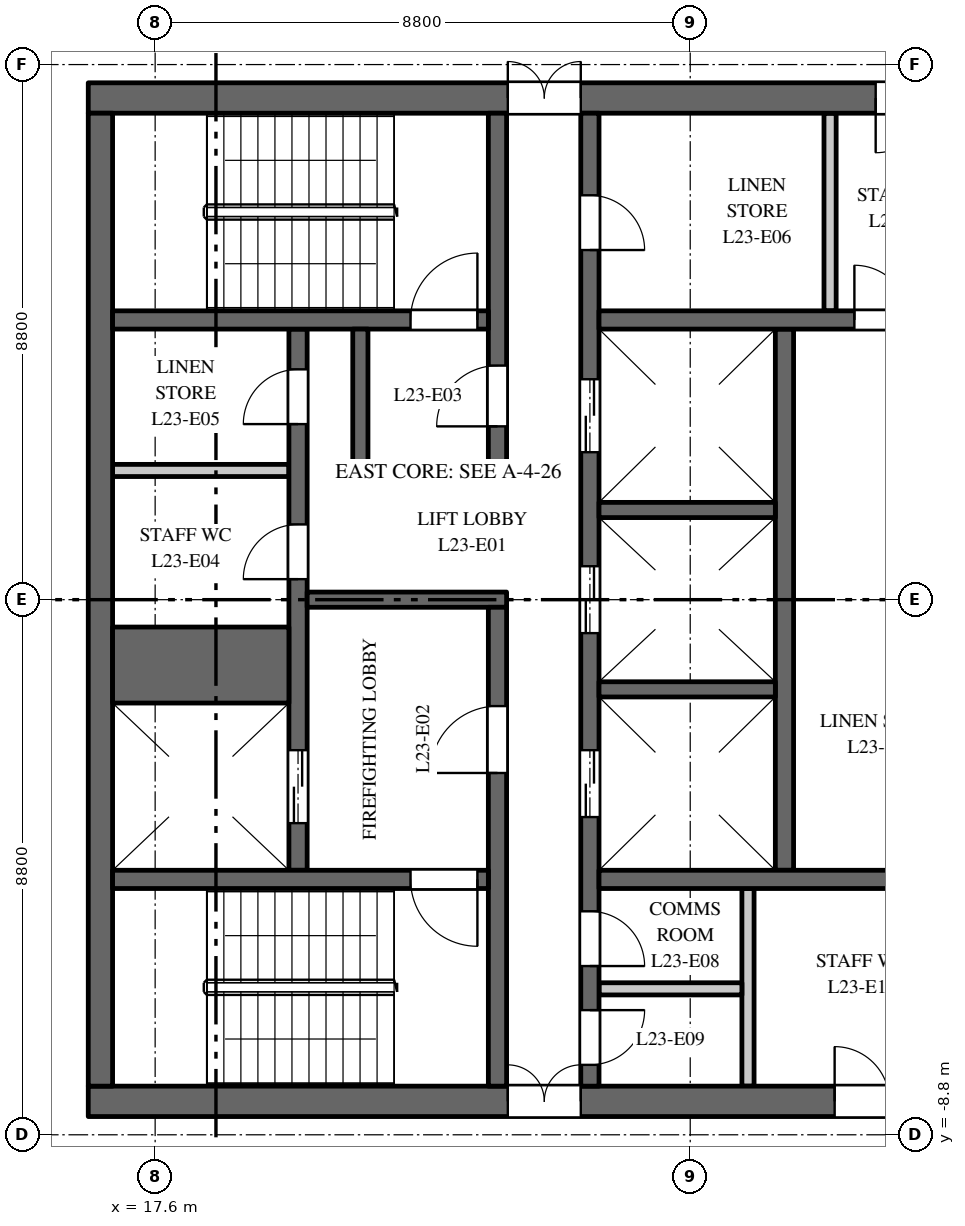
"""IFC4 building model, lengths in metres.
Left out: names, types, materials, properties, quantities, classifications, styles, units other than length and angle.
Written with IfcOpenShell. Run it as: python <this file> out.ifc"""

import sys

from ifc_helpers import new_model, si_unit, direction, frame, frame_2d, origin, place, context, subcontext, project, spatial, rectangle, extrude, element, fill, save


model = new_model("IFC4")
c1 = context("Model", 3, precision=1e-05, world=origin(), true_north=direction((0.0, 1.0)))
c2 = subcontext(c1, "Body", "Model", "MODEL_VIEW")
j1 = project(units=[si_unit("LENGTHUNIT", "METRE"), si_unit("PLANEANGLEUNIT", "RADIAN")], contexts=[c1])
p1 = place(None, origin())
s1 = spatial("IfcSite", under=j1, at=p1, CompositionType="ELEMENT")
p2 = place(p1, origin())
s2 = spatial("IfcBuilding", under=s1, at=p2, CompositionType="ELEMENT")
p3 = place(p2, frame((0.0, 0.0, 104.0)))
s3 = spatial("IfcBuildingStorey", under=s2, at=p3, CompositionType="ELEMENT", Elevation=104.0)
p4 = place(p3, frame((16.5, 8.25, 0.0), z_axis=(0.0, 0.0, 1.0), x_axis=(1.0, 0.0, 0.0)))
e1 = element("IfcWall", 1, at=p4, inside=s3, PredefinedType="SHEAR", context=c2, shape_type="SweptSolid", body=[
    extrude(rectangle(XDim=15.0, YDim=0.5, at=frame_2d((7.5, 0.0))), origin(), (0.0, 0.0, 1.0), 3.7),
])
p5 = place(p4, frame((6.9, 0.0, 0.0)))
e2 = element("IfcOpeningElement", 2, at=p5, cuts=e1, PredefinedType="OPENING", context=c2, shape_type="SweptSolid", body=[
    extrude(rectangle(XDim=1.2, YDim=2.1, at=frame_2d((0.6, 1.05))), frame((0.0, 0.26, 0.0), z_axis=(0.0, -1.0, 0.0), x_axis=(1.0, 0.0, 0.0)), (0.0, 0.0, 1.0), 0.52),
])
p6 = place(p4, frame((12.95, 0.0, 0.0)))
e3 = element("IfcOpeningElement", 3, at=p6, cuts=e1, PredefinedType="OPENING", context=c2, shape_type="SweptSolid", body=[
    extrude(rectangle(XDim=0.9, YDim=2.1, at=frame_2d((0.45, 1.05))), frame((0.0, 0.26, 0.0), z_axis=(0.0, -1.0, 0.0), x_axis=(1.0, 0.0, 0.0)), (0.0, 0.0, 1.0), 0.52),
])
p7 = place(p3, frame((16.5, -8.25, 0.0), z_axis=(0.0, 0.0, 1.0), x_axis=(1.0, 0.0, 0.0)))
e4 = element("IfcWall", 4, at=p7, inside=s3, PredefinedType="SHEAR", context=c2, shape_type="SweptSolid", body=[
    extrude(rectangle(XDim=15.0, YDim=0.5, at=frame_2d((7.5, 0.0))), origin(), (0.0, 0.0, 1.0), 3.7),
])
p8 = place(p7, frame((6.9, 0.0, 0.0)))
e5 = element("IfcOpeningElement", 5, at=p8, cuts=e4, PredefinedType="OPENING", context=c2, shape_type="SweptSolid", body=[
    extrude(rectangle(XDim=1.2, YDim=2.1, at=frame_2d((0.6, 1.05))), frame((0.0, 0.26, 0.0), z_axis=(0.0, -1.0, 0.0), x_axis=(1.0, 0.0, 0.0)), (0.0, 0.0, 1.0), 0.52),
])
p9 = place(p7, frame((12.275, 0.0, 0.0)))
e6 = element("IfcOpeningElement", 6, at=p9, cuts=e4, PredefinedType="OPENING", context=c2, shape_type="SweptSolid", body=[
    extrude(rectangle(XDim=0.9, YDim=2.1, at=frame_2d((0.45, 1.05))), frame((0.0, 0.26, 0.0), z_axis=(0.0, -1.0, 0.0), x_axis=(1.0, 0.0, 0.0)), (0.0, 0.0, 1.0), 0.52),
])
p10 = place(p3, frame((16.9, 2.125, 0.0), z_axis=(0.0, 0.0, 1.0), x_axis=(1.0, 0.0, 0.0)))
e7 = element("IfcWall", 7, at=p10, inside=s3, PredefinedType="PARTITIONING", context=c2, shape_type="SweptSolid", body=[
    extrude(rectangle(XDim=2.9, YDim=0.2, at=frame_2d((1.45, 0.0))), origin(), (0.0, 0.0, 1.0), 3.7),
])
p11 = place(p3, frame((27.95, -4.45, 0.0), z_axis=(0.0, 0.0, 1.0), x_axis=(0.0, 1.0, 0.0)))
e8 = element("IfcWall", 8, at=p11, inside=s3, PredefinedType="SHEAR", context=c2, shape_type="SweptSolid", body=[
    extrude(rectangle(XDim=8.9, YDim=0.3, at=frame_2d((4.45, 0.0))), origin(), (0.0, 0.0, 1.0), 3.7),
])
p12 = place(p3, frame((19.95, -4.45, 0.0), z_axis=(0.0, 0.0, 1.0), x_axis=(0.0, 1.0, 0.0)))
e9 = element("IfcWall", 9, at=p12, inside=s3, PredefinedType="SHEAR", context=c2, shape_type="SweptSolid", body=[
    extrude(rectangle(XDim=8.9, YDim=0.3, at=frame_2d((4.45, 0.0))), origin(), (0.0, 0.0, 1.0), 3.7),
])
p13 = place(p12, frame((0.775, 0.0, 0.0)))
e10 = element("IfcOpeningElement", 10, at=p13, cuts=e9, PredefinedType="OPENING", context=c2, shape_type="SweptSolid", body=[
    extrude(rectangle(XDim=1.2, YDim=2.1, at=frame_2d((0.6, 1.05))), frame((0.0, 0.16, 0.0), z_axis=(0.0, -1.0, 0.0), x_axis=(1.0, 0.0, 0.0)), (0.0, 0.0, 1.0), 0.32),
])
p14 = place(p12, frame((4.788, 0.0, 0.0)))
e11 = element("IfcOpeningElement", 11, at=p14, cuts=e9, PredefinedType="OPENING", context=c2, shape_type="SweptSolid", body=[
    extrude(rectangle(XDim=0.9, YDim=2.1, at=frame_2d((0.45, 1.05))), frame((0.0, 0.16, 0.0), z_axis=(0.0, -1.0, 0.0), x_axis=(1.0, 0.0, 0.0)), (0.0, 0.0, 1.0), 0.32),
])
p15 = place(p12, frame((7.337, 0.0, 0.0)))
e12 = element("IfcOpeningElement", 12, at=p15, cuts=e9, PredefinedType="OPENING", context=c2, shape_type="SweptSolid", body=[
    extrude(rectangle(XDim=0.9, YDim=2.1, at=frame_2d((0.45, 1.05))), frame((0.0, 0.16, 0.0), z_axis=(0.0, -1.0, 0.0), x_axis=(1.0, 0.0, 0.0)), (0.0, 0.0, 1.0), 0.32),
])
p16 = place(p3, frame((24.75, -8.0, 0.0), z_axis=(0.0, 0.0, 1.0), x_axis=(0.0, 1.0, 0.0)))
e13 = element("IfcWall", 13, at=p16, inside=s3, PredefinedType="SHEAR", context=c2, shape_type="SweptSolid", body=[
    extrude(rectangle(XDim=16.0, YDim=0.3, at=frame_2d((8.0, 0.0))), origin(), (0.0, 0.0, 1.0), 3.7),
])
p17 = place(p16, frame((4.425, 0.0, 0.0)))
e14 = element("IfcOpeningElement", 14, at=p17, cuts=e13, PredefinedType="OPENING", context=c2, shape_type="SweptSolid", body=[
    extrude(rectangle(XDim=1.1, YDim=2.1, at=frame_2d((0.55, 1.05))), frame((0.0, 0.16, 0.0), z_axis=(0.0, -1.0, 0.0), x_axis=(1.0, 0.0, 0.0)), (0.0, 0.0, 1.0), 0.32),
])
p18 = place(p16, frame((7.45, 0.0, 0.0)))
e15 = element("IfcOpeningElement", 15, at=p18, cuts=e13, PredefinedType="OPENING", context=c2, shape_type="SweptSolid", body=[
    extrude(rectangle(XDim=1.1, YDim=2.1, at=frame_2d((0.55, 1.05))), frame((0.0, 0.16, 0.0), z_axis=(0.0, -1.0, 0.0), x_axis=(1.0, 0.0, 0.0)), (0.0, 0.0, 1.0), 0.32),
])
p19 = place(p16, frame((10.425, 0.0, 0.0)))
e16 = element("IfcOpeningElement", 16, at=p19, cuts=e13, PredefinedType="OPENING", context=c2, shape_type="SweptSolid", body=[
    extrude(rectangle(XDim=1.2, YDim=2.1, at=frame_2d((0.6, 1.05))), frame((0.0, 0.16, 0.0), z_axis=(0.0, -1.0, 0.0), x_axis=(1.0, 0.0, 0.0)), (0.0, 0.0, 1.0), 0.32),
])
p20 = place(p16, frame((13.75, 0.0, 0.0)))
e17 = element("IfcOpeningElement", 17, at=p20, cuts=e13, PredefinedType="OPENING", context=c2, shape_type="SweptSolid", body=[
    extrude(rectangle(XDim=0.9, YDim=2.1, at=frame_2d((0.45, 1.05))), frame((0.0, 0.16, 0.0), z_axis=(0.0, -1.0, 0.0), x_axis=(1.0, 0.0, 0.0)), (0.0, 0.0, 1.0), 0.32),
])
p21 = place(p16, frame((1.975, 0.0, 0.0)))
e18 = element("IfcOpeningElement", 18, at=p21, cuts=e13, PredefinedType="OPENING", context=c2, shape_type="SweptSolid", body=[
    extrude(rectangle(XDim=0.9, YDim=2.1, at=frame_2d((0.45, 1.05))), frame((0.0, 0.16, 0.0), z_axis=(0.0, -1.0, 0.0), x_axis=(1.0, 0.0, 0.0)), (0.0, 0.0, 1.0), 0.32),
])
p22 = place(p16, frame((0.35, 0.0, 0.0)))
e19 = element("IfcOpeningElement", 19, at=p22, cuts=e13, PredefinedType="OPENING", context=c2, shape_type="SweptSolid", body=[
    extrude(rectangle(XDim=0.9, YDim=2.1, at=frame_2d((0.45, 1.05))), frame((0.0, 0.16, 0.0), z_axis=(0.0, -1.0, 0.0), x_axis=(1.0, 0.0, 0.0)), (0.0, 0.0, 1.0), 0.32),
])
p23 = place(p3, frame((20.1, 0.0, 0.0), z_axis=(0.0, 0.0, 1.0), x_axis=(1.0, 0.0, 0.0)))
e20 = element("IfcWall", 20, at=p23, inside=s3, PredefinedType="SHEAR", context=c2, shape_type="SweptSolid", body=[
    extrude(rectangle(XDim=3.28, YDim=0.25, at=frame_2d((1.64, 0.0))), origin(), (0.0, 0.0, 1.0), 3.7),
])
p24 = place(p3, frame((16.7, -8.0, 0.0), z_axis=(0.0, 0.0, 1.0), x_axis=(0.0, 1.0, 0.0)))
e21 = element("IfcWall", 21, at=p24, inside=s3, PredefinedType="SHEAR", context=c2, shape_type="SweptSolid", body=[
    extrude(rectangle(XDim=16.0, YDim=0.4, at=frame_2d((8.0, 0.0))), origin(), (0.0, 0.0, 1.0), 3.7),
])
p25 = place(p3, frame((24.9, 4.6, 0.0), z_axis=(0.0, 0.0, 1.0), x_axis=(1.0, 0.0, 0.0)))
e22 = element("IfcWall", 22, at=p25, inside=s3, PredefinedType="SHEAR", context=c2, shape_type="SweptSolid", body=[
    extrude(rectangle(XDim=6.1, YDim=0.3, at=frame_2d((3.05, 0.0))), origin(), (0.0, 0.0, 1.0), 3.7),
])
p26 = place(p25, frame((4.2, 0.0, 0.0)))
e23 = element("IfcOpeningElement", 23, at=p26, cuts=e22, PredefinedType="OPENING", context=c2, shape_type="SweptSolid", body=[
    extrude(rectangle(XDim=0.9, YDim=2.1, at=frame_2d((0.45, 1.05))), frame((0.0, 0.16, 0.0), z_axis=(0.0, -1.0, 0.0), x_axis=(1.0, 0.0, 0.0)), (0.0, 0.0, 1.0), 0.32),
])
for number, where, z_axis, x_axis in (
    (24, (28.7, 4.75, 0.0), (0.0, 0.0, 1.0), (0.0, 1.0, 0.0)),
    (25, (27.35, -8.0, 0.0), (0.0, 0.0, 1.0), (0.0, 1.0, 0.0)),
):
    element("IfcWall", number, at=place(p3, frame(where, z_axis=z_axis, x_axis=x_axis)), inside=s3, PredefinedType="PARTITIONING", context=c2, shape_type="SweptSolid", body=[
        extrude(rectangle(XDim=3.25, YDim=0.2, at=frame_2d((1.625, 0.0))), origin(), (0.0, 0.0, 1.0), 3.7),
    ])
p27 = place(p3, frame((24.9, -6.4, 0.0), z_axis=(0.0, 0.0, 1.0), x_axis=(1.0, 0.0, 0.0)))
e26 = element("IfcWall", 26, at=p27, inside=s3, PredefinedType="PARTITIONING", context=c2, shape_type="SweptSolid", body=[
    extrude(rectangle(XDim=2.35, YDim=0.2, at=frame_2d((1.175, 0.0))), origin(), (0.0, 0.0, 1.0), 3.7),
])
p28 = place(p3, frame((24.9, -4.6, 0.0), z_axis=(0.0, 0.0, 1.0), x_axis=(1.0, 0.0, 0.0)))
e27 = element("IfcWall", 27, at=p28, inside=s3, PredefinedType="SHEAR", context=c2, shape_type="SweptSolid", body=[
    extrude(rectangle(XDim=6.1, YDim=0.3, at=frame_2d((3.05, 0.0))), origin(), (0.0, 0.0, 1.0), 3.7),
])
p29 = place(p3, frame((16.9, -1.075, 0.0), z_axis=(0.0, 0.0, 1.0), x_axis=(1.0, 0.0, 0.0)))
e28 = element("IfcWall", 28, at=p29, inside=s3, PredefinedType="SHEAR", context=c2, shape_type="SweptSolid", body=[
    extrude(rectangle(XDim=2.9, YDim=1.25, at=frame_2d((1.45, 0.0))), origin(), (0.0, 0.0, 1.0), 3.7),
])
for number, where, z_axis, x_axis in (
    (29, (24.9, -1.475, 0.0), (0.0, 0.0, 1.0), (1.0, 0.0, 0.0)),
    (30, (24.9, 1.475, 0.0), (0.0, 0.0, 1.0), (1.0, 0.0, 0.0)),
):
    element("IfcWall", number, at=place(p3, frame(where, z_axis=z_axis, x_axis=x_axis)), inside=s3, PredefinedType="SHEAR", context=c2, shape_type="SweptSolid", body=[
        extrude(rectangle(XDim=2.9, YDim=0.25, at=frame_2d((1.45, 0.0))), origin(), (0.0, 0.0, 1.0), 3.7),
    ])
p30 = place(p3, frame((23.23, 2.25, 0.0), z_axis=(0.0, 0.0, 1.0), x_axis=(0.0, 1.0, 0.0)))
e31 = element("IfcWall", 31, at=p30, inside=s3, PredefinedType="SHEAR", context=c2, shape_type="SweptSolid", body=[
    extrude(rectangle(XDim=5.75, YDim=0.3, at=frame_2d((2.875, 0.0))), origin(), (0.0, 0.0, 1.0), 3.7),
])
p31 = place(p30, frame((0.6, 0.0, 0.0)))
e32 = element("IfcOpeningElement", 32, at=p31, cuts=e31, PredefinedType="OPENING", context=c2, shape_type="SweptSolid", body=[
    extrude(rectangle(XDim=1.0, YDim=2.1, at=frame_2d((0.5, 1.05))), frame((0.0, 0.16, 0.0), z_axis=(0.0, -1.0, 0.0), x_axis=(1.0, 0.0, 0.0)), (0.0, 0.0, 1.0), 0.32),
])
p32 = place(p3, frame((23.23, -8.0, 0.0), z_axis=(0.0, 0.0, 1.0), x_axis=(0.0, 1.0, 0.0)))
e33 = element("IfcWall", 33, at=p32, inside=s3, PredefinedType="SHEAR", context=c2, shape_type="SweptSolid", body=[
    extrude(rectangle(XDim=7.875, YDim=0.3, at=frame_2d((3.938, 0.0))), origin(), (0.0, 0.0, 1.0), 3.7),
])
p33 = place(p32, frame((5.15, 0.0, 0.0)))
e34 = element("IfcOpeningElement", 34, at=p33, cuts=e33, PredefinedType="OPENING", context=c2, shape_type="SweptSolid", body=[
    extrude(rectangle(XDim=1.1, YDim=2.1, at=frame_2d((0.55, 1.05))), frame((0.0, 0.16, 0.0), z_axis=(0.0, -1.0, 0.0), x_axis=(1.0, 0.0, 0.0)), (0.0, 0.0, 1.0), 0.32),
])
p34 = place(p3, frame((16.9, 4.6, 0.0), z_axis=(0.0, 0.0, 1.0), x_axis=(1.0, 0.0, 0.0)))
e35 = element("IfcWall", 35, at=p34, inside=s3, PredefinedType="SHEAR", context=c2, shape_type="SweptSolid", body=[
    extrude(rectangle(XDim=6.18, YDim=0.3, at=frame_2d((3.09, 0.0))), origin(), (0.0, 0.0, 1.0), 3.7),
])
p35 = place(p34, frame((4.9, 0.0, 0.0)))
e36 = element("IfcOpeningElement", 36, at=p35, cuts=e35, PredefinedType="OPENING", context=c2, shape_type="SweptSolid", body=[
    extrude(rectangle(XDim=1.1, YDim=2.1, at=frame_2d((0.55, 1.05))), frame((0.0, 0.16, 0.0), z_axis=(0.0, -1.0, 0.0), x_axis=(1.0, 0.0, 0.0)), (0.0, 0.0, 1.0), 0.32),
])
p36 = place(p3, frame((16.9, -4.6, 0.0), z_axis=(0.0, 0.0, 1.0), x_axis=(1.0, 0.0, 0.0)))
e37 = element("IfcWall", 37, at=p36, inside=s3, PredefinedType="SHEAR", context=c2, shape_type="SweptSolid", body=[
    extrude(rectangle(XDim=6.18, YDim=0.3, at=frame_2d((3.09, 0.0))), origin(), (0.0, 0.0, 1.0), 3.7),
])
p37 = place(p36, frame((4.9, 0.0, 0.0)))
e38 = element("IfcOpeningElement", 38, at=p37, cuts=e37, PredefinedType="OPENING", context=c2, shape_type="SweptSolid", body=[
    extrude(rectangle(XDim=1.1, YDim=2.1, at=frame_2d((0.55, 1.05))), frame((0.0, 0.16, 0.0), z_axis=(0.0, -1.0, 0.0), x_axis=(1.0, 0.0, 0.0)), (0.0, 0.0, 1.0), 0.32),
])
p38 = place(p3, frame((20.85, 2.125, 0.0), z_axis=(0.0, 0.0, 1.0), x_axis=(1.0, 0.0, 0.0)))
e39 = element("IfcWall", 39, at=p38, inside=s3, PredefinedType="SHEAR", context=c2, shape_type="SweptSolid", body=[
    extrude(rectangle(XDim=2.53, YDim=0.25, at=frame_2d((1.265, 0.0))), origin(), (0.0, 0.0, 1.0), 3.7),
])
p39 = place(p3, frame((20.975, 2.25, 0.0), z_axis=(0.0, 0.0, 1.0), x_axis=(0.0, 1.0, 0.0)))
e40 = element("IfcWall", 40, at=p39, inside=s3, PredefinedType="SHEAR", context=c2, shape_type="SweptSolid", body=[
    extrude(rectangle(XDim=2.2, YDim=0.25, at=frame_2d((1.1, 0.0))), origin(), (0.0, 0.0, 1.0), 3.7),
])
p40 = place(p13, origin())
e41 = element("IfcDoor", 41, at=p40, inside=s3, OperationType="DOUBLE_DOOR_SLIDING", PredefinedType="DOOR", context=c2, shape_type="SweptSolid", body=[
    extrude(rectangle(XDim=1.2, YDim=2.1, at=frame_2d((0.6, 1.05))), frame((0.0, 0.025, 0.0), z_axis=(0.0, -1.0, 0.0), x_axis=(1.0, 0.0, 0.0)), (0.0, 0.0, 1.0), 0.05),
])
fill(e10, e41)
p41 = place(p17, origin())
e42 = element("IfcDoor", 42, at=p41, inside=s3, OperationType="DOUBLE_DOOR_SLIDING", PredefinedType="DOOR", context=c2, shape_type="SweptSolid", body=[
    extrude(rectangle(XDim=1.1, YDim=2.1, at=frame_2d((0.55, 1.05))), frame((0.0, 0.025, 0.0), z_axis=(0.0, -1.0, 0.0), x_axis=(1.0, 0.0, 0.0)), (0.0, 0.0, 1.0), 0.05),
])
fill(e14, e42)
p42 = place(p18, origin())
e43 = element("IfcDoor", 43, at=p42, inside=s3, OperationType="DOUBLE_DOOR_SLIDING", PredefinedType="DOOR", context=c2, shape_type="SweptSolid", body=[
    extrude(rectangle(XDim=1.1, YDim=2.1, at=frame_2d((0.55, 1.05))), frame((0.0, 0.025, 0.0), z_axis=(0.0, -1.0, 0.0), x_axis=(1.0, 0.0, 0.0)), (0.0, 0.0, 1.0), 0.05),
])
fill(e15, e43)
p43 = place(p19, origin())
e44 = element("IfcDoor", 44, at=p43, inside=s3, OperationType="DOUBLE_DOOR_SLIDING", PredefinedType="DOOR", context=c2, shape_type="SweptSolid", body=[
    extrude(rectangle(XDim=1.2, YDim=2.1, at=frame_2d((0.6, 1.05))), frame((0.0, 0.025, 0.0), z_axis=(0.0, -1.0, 0.0), x_axis=(1.0, 0.0, 0.0)), (0.0, 0.0, 1.0), 0.05),
])
fill(e16, e44)
p44 = place(p35, origin())
e45 = element("IfcDoor", 45, at=p44, inside=s3, OperationType="SINGLE_SWING_LEFT", PredefinedType="DOOR", context=c2, shape_type="SweptSolid", body=[
    extrude(rectangle(XDim=1.1, YDim=2.1, at=frame_2d((0.55, 1.05))), frame((0.0, 0.025, 0.0), z_axis=(0.0, -1.0, 0.0), x_axis=(1.0, 0.0, 0.0)), (0.0, 0.0, 1.0), 0.05),
])
fill(e36, e45)
p45 = place(p37, origin())
e46 = element("IfcDoor", 46, at=p45, inside=s3, OperationType="SINGLE_SWING_RIGHT", PredefinedType="DOOR", context=c2, shape_type="SweptSolid", body=[
    extrude(rectangle(XDim=1.1, YDim=2.1, at=frame_2d((0.55, 1.05))), frame((0.0, 0.025, 0.0), z_axis=(0.0, -1.0, 0.0), x_axis=(1.0, 0.0, 0.0)), (0.0, 0.0, 1.0), 0.05),
])
fill(e38, e46)
p46 = place(p33, origin())
e47 = element("IfcDoor", 47, at=p46, inside=s3, OperationType="SINGLE_SWING_RIGHT", PredefinedType="DOOR", context=c2, shape_type="SweptSolid", body=[
    extrude(rectangle(XDim=1.1, YDim=2.1, at=frame_2d((0.55, 1.05))), frame((0.0, 0.025, 0.0), z_axis=(0.0, -1.0, 0.0), x_axis=(1.0, 0.0, 0.0)), (0.0, 0.0, 1.0), 0.05),
])
fill(e34, e47)
p47 = place(p31, origin())
e48 = element("IfcDoor", 48, at=p47, inside=s3, OperationType="SINGLE_SWING_RIGHT", PredefinedType="DOOR", context=c2, shape_type="SweptSolid", body=[
    extrude(rectangle(XDim=1.0, YDim=2.1, at=frame_2d((0.5, 1.05))), frame((0.0, 0.025, 0.0), z_axis=(0.0, -1.0, 0.0), x_axis=(1.0, 0.0, 0.0)), (0.0, 0.0, 1.0), 0.05),
])
fill(e32, e48)
p48 = place(p5, origin())
e49 = element("IfcDoor", 49, at=p48, inside=s3, OperationType="DOUBLE_DOOR_DOUBLE_SWING", PredefinedType="DOOR", context=c2, shape_type="SweptSolid", body=[
    extrude(rectangle(XDim=1.2, YDim=2.1, at=frame_2d((0.6, 1.05))), frame((0.0, 0.025, 0.0), z_axis=(0.0, -1.0, 0.0), x_axis=(1.0, 0.0, 0.0)), (0.0, 0.0, 1.0), 0.05),
])
fill(e2, e49)
p49 = place(p8, origin())
e50 = element("IfcDoor", 50, at=p49, inside=s3, OperationType="DOUBLE_DOOR_DOUBLE_SWING", PredefinedType="DOOR", context=c2, shape_type="SweptSolid", body=[
    extrude(rectangle(XDim=1.2, YDim=2.1, at=frame_2d((0.6, 1.05))), frame((0.0, 0.025, 0.0), z_axis=(0.0, -1.0, 0.0), x_axis=(1.0, 0.0, 0.0)), (0.0, 0.0, 1.0), 0.05),
])
fill(e5, e50)
p50 = place(p14, origin())
e51 = element("IfcDoor", 51, at=p50, inside=s3, OperationType="SINGLE_SWING_RIGHT", PredefinedType="DOOR", context=c2, shape_type="SweptSolid", body=[
    extrude(rectangle(XDim=0.9, YDim=2.1, at=frame_2d((0.45, 1.05))), frame((0.0, 0.025, 0.0), z_axis=(0.0, -1.0, 0.0), x_axis=(1.0, 0.0, 0.0)), (0.0, 0.0, 1.0), 0.05),
])
fill(e11, e51)
p51 = place(p15, origin())
e52 = element("IfcDoor", 52, at=p51, inside=s3, OperationType="SINGLE_SWING_RIGHT", PredefinedType="DOOR", context=c2, shape_type="SweptSolid", body=[
    extrude(rectangle(XDim=0.9, YDim=2.1, at=frame_2d((0.45, 1.05))), frame((0.0, 0.025, 0.0), z_axis=(0.0, -1.0, 0.0), x_axis=(1.0, 0.0, 0.0)), (0.0, 0.0, 1.0), 0.05),
])
fill(e12, e52)
p52 = place(p20, origin())
e53 = element("IfcDoor", 53, at=p52, inside=s3, OperationType="SINGLE_SWING_LEFT", PredefinedType="DOOR", context=c2, shape_type="SweptSolid", body=[
    extrude(rectangle(XDim=0.9, YDim=2.1, at=frame_2d((0.45, 1.05))), frame((0.0, 0.025, 0.0), z_axis=(0.0, -1.0, 0.0), x_axis=(1.0, 0.0, 0.0)), (0.0, 0.0, 1.0), 0.05),
])
fill(e17, e53)
p53 = place(p6, origin())
e54 = element("IfcDoor", 54, at=p53, inside=s3, OperationType="SINGLE_SWING_LEFT", PredefinedType="DOOR", context=c2, shape_type="SweptSolid", body=[
    extrude(rectangle(XDim=0.9, YDim=2.1, at=frame_2d((0.45, 1.05))), frame((0.0, 0.025, 0.0), z_axis=(0.0, -1.0, 0.0), x_axis=(1.0, 0.0, 0.0)), (0.0, 0.0, 1.0), 0.05),
])
fill(e3, e54)
p54 = place(p21, origin())
e55 = element("IfcDoor", 55, at=p54, inside=s3, OperationType="SINGLE_SWING_LEFT", PredefinedType="DOOR", context=c2, shape_type="SweptSolid", body=[
    extrude(rectangle(XDim=0.9, YDim=2.1, at=frame_2d((0.45, 1.05))), frame((0.0, 0.025, 0.0), z_axis=(0.0, -1.0, 0.0), x_axis=(1.0, 0.0, 0.0)), (0.0, 0.0, 1.0), 0.05),
])
fill(e18, e55)
p55 = place(p22, origin())
e56 = element("IfcDoor", 56, at=p55, inside=s3, OperationType="SINGLE_SWING_RIGHT", PredefinedType="DOOR", context=c2, shape_type="SweptSolid", body=[
    extrude(rectangle(XDim=0.9, YDim=2.1, at=frame_2d((0.45, 1.05))), frame((0.0, 0.025, 0.0), z_axis=(0.0, -1.0, 0.0), x_axis=(1.0, 0.0, 0.0)), (0.0, 0.0, 1.0), 0.05),
])
fill(e19, e56)
p56 = place(p9, origin())
e57 = element("IfcDoor", 57, at=p56, inside=s3, OperationType="SINGLE_SWING_RIGHT", PredefinedType="DOOR", context=c2, shape_type="SweptSolid", body=[
    extrude(rectangle(XDim=0.9, YDim=2.1, at=frame_2d((0.45, 1.05))), frame((0.0, 0.025, 0.0), z_axis=(0.0, -1.0, 0.0), x_axis=(1.0, 0.0, 0.0)), (0.0, 0.0, 1.0), 0.05),
])
fill(e6, e57)
p57 = place(p26, origin())
e58 = element("IfcDoor", 58, at=p57, inside=s3, OperationType="SINGLE_SWING_RIGHT", PredefinedType="DOOR", context=c2, shape_type="SweptSolid", body=[
    extrude(rectangle(XDim=0.9, YDim=2.1, at=frame_2d((0.45, 1.05))), frame((0.0, 0.025, 0.0), z_axis=(0.0, -1.0, 0.0), x_axis=(1.0, 0.0, 0.0)), (0.0, 0.0, 1.0), 0.05),
])
fill(e23, e58)
save(model, sys.argv[1])
